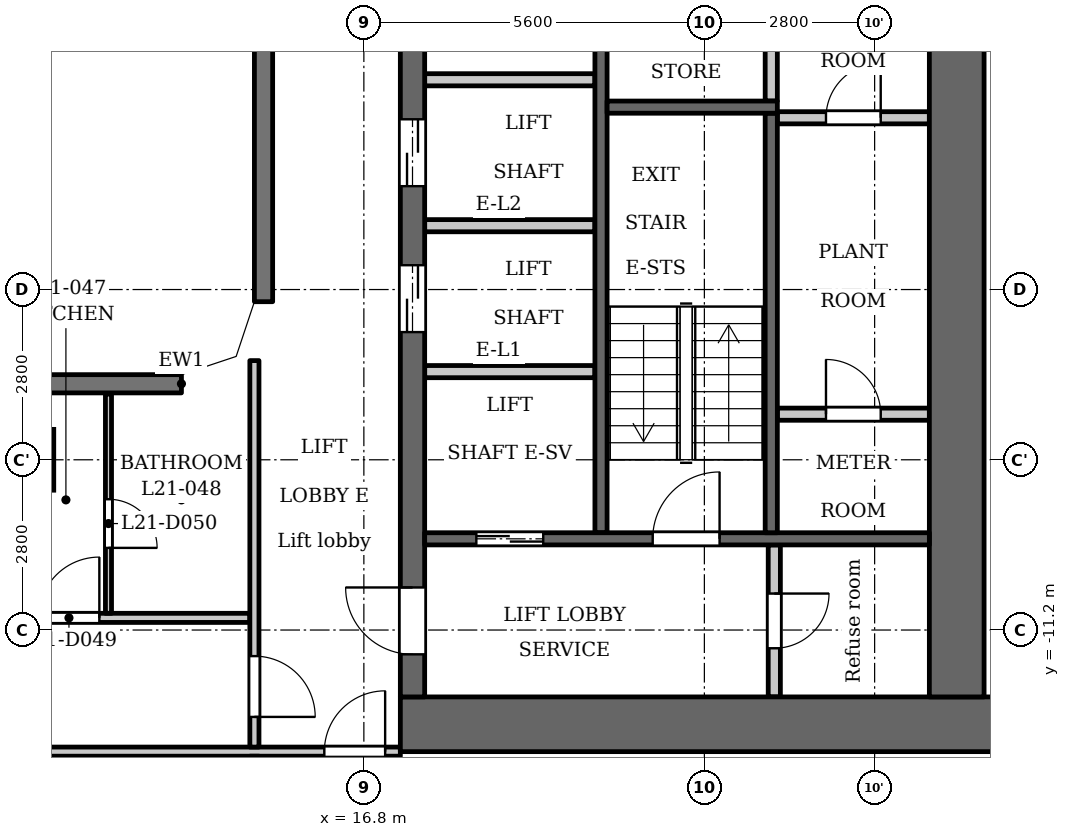
"""IFC4 building model, lengths in metres.
Left out: names, types, materials, properties, quantities, classifications, styles, units other than length and angle.
Written with IfcOpenShell. Run it as: python <this file> out.ifc"""

import sys

from ifc_helpers import new_model, si_unit, direction, frame, frame_2d, origin, origin_2d, place, context, subcontext, project, spatial, polyline, rectangle, outline, extrude, element, fill, save


model = new_model("IFC4")
c1 = context("Model", 3, precision=1e-05, world=origin(), true_north=direction((0.0, 1.0)))
c2 = subcontext(c1, "Body", "Model", "MODEL_VIEW")
j1 = project(units=[si_unit("LENGTHUNIT", "METRE"), si_unit("PLANEANGLEUNIT", "RADIAN")], contexts=[c1])
p1 = place(None, origin())
s1 = spatial("IfcSite", under=j1, at=p1, CompositionType="ELEMENT")
p2 = place(p1, origin())
s2 = spatial("IfcBuilding", under=s1, at=p2, CompositionType="ELEMENT")
p3 = place(p2, frame((0.0, 0.0, 86.8)))
s3 = spatial("IfcBuildingStorey", under=s2, at=p3, CompositionType="ELEMENT", Elevation=86.8)
p4 = place(p3, frame((11.2, -8.4, 0.0), z_axis=(0.0, 0.0, 1.0), x_axis=(1.0, 0.0, 0.0)))
e1 = element("IfcColumn", 1, at=p4, inside=s3, PredefinedType="COLUMN", context=c2, shape_type="SweptSolid", body=[
    extrude(rectangle(XDim=1.0, YDim=1.0, at=origin_2d()), origin(), (0.0, 0.0, 1.0), 3.5),
])
p5 = place(p3, frame((15.15, 5.8, 0.0), z_axis=(0.0, 0.0, 1.0), x_axis=(0.0, -1.0, 0.0)))
e2 = element("IfcWall", 2, at=p5, inside=s3, PredefinedType="SOLIDWALL", context=c2, shape_type="SweptSolid", body=[
    extrude(rectangle(XDim=11.6, YDim=0.3, at=frame_2d((5.8, 0.0))), origin(), (0.0, 0.0, 1.0), 3.2),
])
p6 = place(p3, frame((13.8, -7.15, 0.0), z_axis=(0.0, 0.0, 1.0), x_axis=(-1.0, 0.0, 0.0)))
e3 = element("IfcWall", 3, at=p6, inside=s3, PredefinedType="SOLIDWALL", context=c2, shape_type="SweptSolid", body=[
    extrude(rectangle(XDim=27.6, YDim=0.3, at=frame_2d((13.8, 0.0))), origin(), (0.0, 0.0, 1.0), 3.2),
])
p7 = place(p6, frame((3.6, 0.0, 1.2)))
e4 = element("IfcOpeningElement", 4, at=p7, cuts=e3, PredefinedType="OPENING", context=c2, shape_type="SweptSolid", body=[
    extrude(rectangle(XDim=3.6, YDim=0.95, at=frame_2d((1.8, 0.475))), frame((0.0, 0.16, 0.0), z_axis=(0.0, -1.0, 0.0), x_axis=(1.0, 0.0, 0.0)), (0.0, 0.0, 1.0), 0.32),
])
p8 = place(p6, frame((8.8, 0.0, 0.6)))
e5 = element("IfcOpeningElement", 5, at=p8, cuts=e3, PredefinedType="OPENING", context=c2, shape_type="SweptSolid", body=[
    extrude(rectangle(XDim=1.2, YDim=1.55, at=frame_2d((0.6, 0.775))), frame((0.0, 0.16, 0.0), z_axis=(0.0, -1.0, 0.0), x_axis=(1.0, 0.0, 0.0)), (0.0, 0.0, 1.0), 0.32),
])
p9 = place(p6, frame((11.3, 0.0, 0.9)))
e6 = element("IfcOpeningElement", 6, at=p9, cuts=e3, PredefinedType="OPENING", context=c2, shape_type="SweptSolid", body=[
    extrude(rectangle(XDim=1.8, YDim=1.25, at=frame_2d((0.9, 0.625))), frame((0.0, 0.16, 0.0), z_axis=(0.0, -1.0, 0.0), x_axis=(1.0, 0.0, 0.0)), (0.0, 0.0, 1.0), 0.32),
])
p10 = place(p6, frame((14.8, 0.0, 1.2)))
e7 = element("IfcOpeningElement", 7, at=p10, cuts=e3, PredefinedType="OPENING", context=c2, shape_type="SweptSolid", body=[
    extrude(rectangle(XDim=3.6, YDim=0.95, at=frame_2d((1.8, 0.475))), frame((0.0, 0.16, 0.0), z_axis=(0.0, -1.0, 0.0), x_axis=(1.0, 0.0, 0.0)), (0.0, 0.0, 1.0), 0.32),
])
p11 = place(p6, frame((20.4, 0.0, 1.2)))
e8 = element("IfcOpeningElement", 8, at=p11, cuts=e3, PredefinedType="OPENING", context=c2, shape_type="SweptSolid", body=[
    extrude(rectangle(XDim=3.6, YDim=0.95, at=frame_2d((1.8, 0.475))), frame((0.0, 0.16, 0.0), z_axis=(0.0, -1.0, 0.0), x_axis=(1.0, 0.0, 0.0)), (0.0, 0.0, 1.0), 0.32),
])
p12 = place(p3, frame((23.5, -2.5, 0.0), z_axis=(0.0, 0.0, 1.0), x_axis=(0.0, 1.0, 0.0)))
e9 = element("IfcWall", 9, at=p12, inside=s3, PredefinedType="PARTITIONING", context=c2, shape_type="SweptSolid", body=[
    extrude(rectangle(XDim=2.65, YDim=0.2, at=frame_2d((1.325, 0.0))), origin(), (0.0, 0.0, 1.0), 3.2),
])
p13 = place(p3, frame((20.7, -9.6, 0.0), z_axis=(0.0, 0.0, 1.0), x_axis=(0.0, 1.0, 0.0)))
e10 = element("IfcWall", 10, at=p13, inside=s3, PredefinedType="SHEAR", context=c2, shape_type="SweptSolid", body=[
    extrude(rectangle(XDim=9.75, YDim=0.2, at=frame_2d((4.875, 0.0))), origin(), (0.0, 0.0, 1.0), 3.2),
])
p14 = place(p3, frame((17.4, -12.75, 0.0), z_axis=(0.0, 0.0, 1.0), x_axis=(1.0, 0.0, 0.0)))
e11 = element("IfcWall", 11, at=p14, inside=s3, PredefinedType="SHEAR", context=c2, shape_type="SweptSolid", body=[
    extrude(rectangle(XDim=10.4, YDim=0.9, at=frame_2d((5.2, 0.0))), origin(), (0.0, 0.0, 1.0), 3.2),
])
p15 = place(p3, frame((17.6, -12.3, 0.0), z_axis=(0.0, 0.0, 1.0), x_axis=(0.0, 1.0, 0.0)))
e12 = element("IfcWall", 12, at=p15, inside=s3, PredefinedType="SHEAR", context=c2, shape_type="SweptSolid", body=[
    extrude(rectangle(XDim=24.6, YDim=0.4, at=frame_2d((12.3, 0.0))), origin(), (0.0, 0.0, 1.0), 3.2),
])
p16 = place(p15, frame((6.0, 0.0, 0.0)))
e13 = element("IfcOpeningElement", 13, at=p16, cuts=e12, PredefinedType="OPENING", context=c2, shape_type="SweptSolid", body=[
    extrude(rectangle(XDim=1.1, YDim=2.1, at=frame_2d((0.55, 1.05))), frame((0.0, 0.21, 0.0), z_axis=(0.0, -1.0, 0.0), x_axis=(1.0, 0.0, 0.0)), (0.0, 0.0, 1.0), 0.42),
])
p17 = place(p15, frame((8.4, 0.0, 0.0)))
e14 = element("IfcOpeningElement", 14, at=p17, cuts=e12, PredefinedType="OPENING", context=c2, shape_type="SweptSolid", body=[
    extrude(rectangle(XDim=1.1, YDim=2.1, at=frame_2d((0.55, 1.05))), frame((0.0, 0.21, 0.0), z_axis=(0.0, -1.0, 0.0), x_axis=(1.0, 0.0, 0.0)), (0.0, 0.0, 1.0), 0.42),
])
p18 = place(p15, frame((10.8, 0.0, 0.0)))
e15 = element("IfcOpeningElement", 15, at=p18, cuts=e12, PredefinedType="OPENING", context=c2, shape_type="SweptSolid", body=[
    extrude(rectangle(XDim=1.1, YDim=2.1, at=frame_2d((0.55, 1.05))), frame((0.0, 0.21, 0.0), z_axis=(0.0, -1.0, 0.0), x_axis=(1.0, 0.0, 0.0)), (0.0, 0.0, 1.0), 0.42),
])
p19 = place(p15, frame((16.75, 0.0, 0.0)))
e16 = element("IfcOpeningElement", 16, at=p19, cuts=e12, PredefinedType="OPENING", context=c2, shape_type="SweptSolid", body=[
    extrude(rectangle(XDim=0.9, YDim=2.1, at=frame_2d((0.45, 1.05))), frame((0.0, 0.21, 0.0), z_axis=(0.0, -1.0, 0.0), x_axis=(1.0, 0.0, 0.0)), (0.0, 0.0, 1.0), 0.42),
])
p20 = place(p15, frame((22.8, 0.0, 0.0)))
e17 = element("IfcOpeningElement", 17, at=p20, cuts=e12, PredefinedType="OPENING", context=c2, shape_type="SweptSolid", body=[
    extrude(rectangle(XDim=1.1, YDim=2.1, at=frame_2d((0.55, 1.05))), frame((0.0, 0.21, 0.0), z_axis=(0.0, -1.0, 0.0), x_axis=(1.0, 0.0, 0.0)), (0.0, 0.0, 1.0), 0.42),
])
p21 = place(p15, frame((0.7, 0.0, 0.0)))
e18 = element("IfcOpeningElement", 18, at=p21, cuts=e12, PredefinedType="OPENING", context=c2, shape_type="SweptSolid", body=[
    extrude(rectangle(XDim=1.1, YDim=2.1, at=frame_2d((0.55, 1.05))), frame((0.0, 0.21, 0.0), z_axis=(0.0, -1.0, 0.0), x_axis=(1.0, 0.0, 0.0)), (0.0, 0.0, 1.0), 0.42),
])
p22 = place(p15, frame((12.775, 0.0, 0.0)))
e19 = element("IfcOpeningElement", 19, at=p22, cuts=e12, PredefinedType="OPENING", context=c2, shape_type="SweptSolid", body=[
    extrude(rectangle(XDim=1.8, YDim=2.1, at=frame_2d((0.9, 1.05))), frame((0.0, 0.21, 0.0), z_axis=(0.0, -1.0, 0.0), x_axis=(1.0, 0.0, 0.0)), (0.0, 0.0, 1.0), 0.42),
])
p23 = place(p3, frame((26.55, -12.3, 0.0), z_axis=(0.0, 0.0, 1.0), x_axis=(0.0, 1.0, 0.0)))
e20 = element("IfcWall", 20, at=p23, inside=s3, PredefinedType="SHEAR", context=c2, shape_type="SweptSolid", body=[
    extrude(rectangle(XDim=24.6, YDim=0.9, at=frame_2d((12.3, 0.0))), origin(), (0.0, 0.0, 1.0), 3.2),
])
p24 = place(p3, frame((23.55, -12.3, 0.0), z_axis=(0.0, 0.0, 1.0), x_axis=(0.0, 1.0, 0.0)))
e21 = element("IfcWall", 21, at=p24, inside=s3, PredefinedType="PARTITIONING", context=c2, shape_type="SweptSolid", body=[
    extrude(rectangle(XDim=2.5, YDim=0.2, at=frame_2d((1.25, 0.0))), origin(), (0.0, 0.0, 1.0), 3.2),
])
p25 = place(p24, frame((0.8, 0.0, 0.0)))
e22 = element("IfcOpeningElement", 22, at=p25, cuts=e21, PredefinedType="OPENING", context=c2, shape_type="SweptSolid", body=[
    extrude(rectangle(XDim=0.9, YDim=2.1, at=frame_2d((0.45, 1.05))), frame((0.0, 0.11, 0.0), z_axis=(0.0, -1.0, 0.0), x_axis=(1.0, 0.0, 0.0)), (0.0, 0.0, 1.0), 0.22),
])
p26 = place(p3, frame((23.6, -7.65, 0.0), z_axis=(0.0, 0.0, 1.0), x_axis=(1.0, 0.0, 0.0)))
e23 = element("IfcWall", 23, at=p26, inside=s3, PredefinedType="PARTITIONING", context=c2, shape_type="SweptSolid", body=[
    extrude(rectangle(XDim=2.5, YDim=0.2, at=frame_2d((1.25, 0.0))), origin(), (0.0, 0.0, 1.0), 3.2),
])
p27 = place(p26, frame((0.8, 0.0, 0.0)))
e24 = element("IfcOpeningElement", 24, at=p27, cuts=e23, PredefinedType="OPENING", context=c2, shape_type="SweptSolid", body=[
    extrude(rectangle(XDim=0.9, YDim=2.1, at=frame_2d((0.45, 1.05))), frame((0.0, 0.11, 0.0), z_axis=(0.0, -1.0, 0.0), x_axis=(1.0, 0.0, 0.0)), (0.0, 0.0, 1.0), 0.22),
])
p28 = place(p3, frame((23.6, -2.775, 0.0), z_axis=(0.0, 0.0, 1.0), x_axis=(1.0, 0.0, 0.0)))
e25 = element("IfcWall", 25, at=p28, inside=s3, PredefinedType="PARTITIONING", context=c2, shape_type="SweptSolid", body=[
    extrude(rectangle(XDim=2.5, YDim=0.2, at=frame_2d((1.25, 0.0))), origin(), (0.0, 0.0, 1.0), 3.2),
])
p29 = place(p28, frame((0.8, 0.0, 0.0)))
e26 = element("IfcOpeningElement", 26, at=p29, cuts=e25, PredefinedType="OPENING", context=c2, shape_type="SweptSolid", body=[
    extrude(rectangle(XDim=0.9, YDim=2.1, at=frame_2d((0.45, 1.05))), frame((0.0, 0.11, 0.0), z_axis=(0.0, -1.0, 0.0), x_axis=(1.0, 0.0, 0.0)), (0.0, 0.0, 1.0), 0.22),
])
p30 = place(p3, frame((17.8, -9.7, 0.0), z_axis=(0.0, 0.0, 1.0), x_axis=(1.0, 0.0, 0.0)))
e27 = element("IfcWall", 27, at=p30, inside=s3, PredefinedType="SHEAR", context=c2, shape_type="SweptSolid", body=[
    extrude(rectangle(XDim=8.3, YDim=0.2, at=frame_2d((4.15, 0.0))), origin(), (0.0, 0.0, 1.0), 3.2),
])
p31 = place(p30, frame((0.85, 0.0, 0.0)))
e28 = element("IfcOpeningElement", 28, at=p31, cuts=e27, PredefinedType="OPENING", context=c2, shape_type="SweptSolid", body=[
    extrude(rectangle(XDim=1.1, YDim=2.1, at=frame_2d((0.55, 1.05))), frame((0.0, 0.11, 0.0), z_axis=(0.0, -1.0, 0.0), x_axis=(1.0, 0.0, 0.0)), (0.0, 0.0, 1.0), 0.22),
])
p32 = place(p30, frame((3.75, 0.0, 0.0)))
e29 = element("IfcOpeningElement", 29, at=p32, cuts=e27, PredefinedType="OPENING", context=c2, shape_type="SweptSolid", body=[
    extrude(rectangle(XDim=1.1, YDim=2.1, at=frame_2d((0.55, 1.05))), frame((0.0, 0.11, 0.0), z_axis=(0.0, -1.0, 0.0), x_axis=(1.0, 0.0, 0.0)), (0.0, 0.0, 1.0), 0.22),
])
for number, where, z_axis, x_axis in (
    (30, (17.8, -6.95, 0.0), (0.0, 0.0, 1.0), (1.0, 0.0, 0.0)),
    (31, (17.8, -4.55, 0.0), (0.0, 0.0, 1.0), (1.0, 0.0, 0.0)),
    (32, (17.8, -2.15, 0.0), (0.0, 0.0, 1.0), (1.0, 0.0, 0.0)),
):
    element("IfcWall", number, at=place(p3, frame(where, z_axis=z_axis, x_axis=x_axis)), inside=s3, PredefinedType="PARTITIONING", context=c2, shape_type="SweptSolid", body=[
        extrude(rectangle(XDim=2.8, YDim=0.2, at=frame_2d((1.4, 0.0))), origin(), (0.0, 0.0, 1.0), 3.2),
    ])
p33 = place(p3, frame((23.5, -9.6, 0.0), z_axis=(0.0, 0.0, 1.0), x_axis=(0.0, 1.0, 0.0)))
e33 = element("IfcWall", 33, at=p33, inside=s3, PredefinedType="SHEAR", context=c2, shape_type="SweptSolid", body=[
    extrude(rectangle(XDim=6.9, YDim=0.2, at=frame_2d((3.45, 0.0))), origin(), (0.0, 0.0, 1.0), 3.2),
])
p34 = place(p3, frame((20.8, -2.6, 0.0), z_axis=(0.0, 0.0, 1.0), x_axis=(1.0, 0.0, 0.0)))
e34 = element("IfcWall", 34, at=p34, inside=s3, PredefinedType="SHEAR", context=c2, shape_type="SweptSolid", body=[
    extrude(rectangle(XDim=2.8, YDim=0.2, at=frame_2d((1.4, 0.0))), origin(), (0.0, 0.0, 1.0), 3.2),
])
p35 = place(p3, frame((-17.4, -13.2, 0.0), z_axis=(0.0, 0.0, 1.0), x_axis=(1.0, 0.0, 0.0)))
e35 = element("IfcWall", 35, at=p35, inside=s3, PredefinedType="PARTITIONING", context=c2, shape_type="SweptSolid", body=[
    extrude(rectangle(XDim=34.8, YDim=0.15, at=frame_2d((17.4, 0.0))), origin(), (0.0, 0.0, 1.0), 3.2),
])
p36 = place(p35, frame((0.15, 0.0, 0.0)))
e36 = element("IfcOpeningElement", 36, at=p36, cuts=e35, PredefinedType="OPENING", context=c2, shape_type="SweptSolid", body=[
    extrude(rectangle(XDim=1.0, YDim=2.1, at=frame_2d((0.5, 1.05))), frame((0.0, 0.085, 0.0), z_axis=(0.0, -1.0, 0.0), x_axis=(1.0, 0.0, 0.0)), (0.0, 0.0, 1.0), 0.17),
])
p37 = place(p35, frame((33.55, 0.0, 0.0)))
e37 = element("IfcOpeningElement", 37, at=p37, cuts=e35, PredefinedType="OPENING", context=c2, shape_type="SweptSolid", body=[
    extrude(rectangle(XDim=1.0, YDim=2.1, at=frame_2d((0.5, 1.05))), frame((0.0, 0.085, 0.0), z_axis=(0.0, -1.0, 0.0), x_axis=(1.0, 0.0, 0.0)), (0.0, 0.0, 1.0), 0.17),
])
p38 = place(p35, frame((7.35, 0.0, 0.0)))
e38 = element("IfcOpeningElement", 38, at=p38, cuts=e35, PredefinedType="OPENING", context=c2, shape_type="SweptSolid", body=[
    extrude(rectangle(XDim=1.0, YDim=2.1, at=frame_2d((0.5, 1.05))), frame((0.0, 0.085, 0.0), z_axis=(0.0, -1.0, 0.0), x_axis=(1.0, 0.0, 0.0)), (0.0, 0.0, 1.0), 0.17),
])
p39 = place(p35, frame((13.7, 0.0, 0.0)))
e39 = element("IfcOpeningElement", 39, at=p39, cuts=e35, PredefinedType="OPENING", context=c2, shape_type="SweptSolid", body=[
    extrude(rectangle(XDim=1.0, YDim=2.1, at=frame_2d((0.5, 1.05))), frame((0.0, 0.085, 0.0), z_axis=(0.0, -1.0, 0.0), x_axis=(1.0, 0.0, 0.0)), (0.0, 0.0, 1.0), 0.17),
])
p40 = place(p35, frame((19.3, 0.0, 0.0)))
e40 = element("IfcOpeningElement", 40, at=p40, cuts=e35, PredefinedType="OPENING", context=c2, shape_type="SweptSolid", body=[
    extrude(rectangle(XDim=1.0, YDim=2.1, at=frame_2d((0.5, 1.05))), frame((0.0, 0.085, 0.0), z_axis=(0.0, -1.0, 0.0), x_axis=(1.0, 0.0, 0.0)), (0.0, 0.0, 1.0), 0.17),
])
p41 = place(p3, frame((-14.925, -11.0, 0.0), z_axis=(0.0, 0.0, 1.0), x_axis=(1.0, 0.0, 0.0)))
e41 = element("IfcWall", 41, at=p41, inside=s3, PredefinedType="PARTITIONING", context=c2, shape_type="SweptSolid", body=[
    extrude(rectangle(XDim=29.85, YDim=0.15, at=frame_2d((14.925, 0.0))), origin(), (0.0, 0.0, 1.0), 3.2),
])
p42 = place(p41, frame((2.575, 0.0, 0.0)))
e42 = element("IfcOpeningElement", 42, at=p42, cuts=e41, PredefinedType="OPENING", context=c2, shape_type="SweptSolid", body=[
    extrude(rectangle(XDim=1.0, YDim=2.1, at=frame_2d((0.5, 1.05))), frame((0.0, 0.085, 0.0), z_axis=(0.0, -1.0, 0.0), x_axis=(1.0, 0.0, 0.0)), (0.0, 0.0, 1.0), 0.17),
])
p43 = place(p41, frame((15.475, 0.0, 0.0)))
e43 = element("IfcOpeningElement", 43, at=p43, cuts=e41, PredefinedType="OPENING", context=c2, shape_type="SweptSolid", body=[
    extrude(rectangle(XDim=1.0, YDim=2.1, at=frame_2d((0.5, 1.05))), frame((0.0, 0.085, 0.0), z_axis=(0.0, -1.0, 0.0), x_axis=(1.0, 0.0, 0.0)), (0.0, 0.0, 1.0), 0.17),
])
p44 = place(p41, frame((26.375, 0.0, 0.0)))
e44 = element("IfcOpeningElement", 44, at=p44, cuts=e41, PredefinedType="OPENING", context=c2, shape_type="SweptSolid", body=[
    extrude(rectangle(XDim=1.0, YDim=2.1, at=frame_2d((0.5, 1.05))), frame((0.0, 0.085, 0.0), z_axis=(0.0, -1.0, 0.0), x_axis=(1.0, 0.0, 0.0)), (0.0, 0.0, 1.0), 0.17),
])
p45 = place(p3, frame((12.6, -10.925, 0.0), z_axis=(0.0, 0.0, 1.0), x_axis=(0.0, 1.0, 0.0)))
e45 = element("IfcWall", 45, at=p45, inside=s3, PredefinedType="PARTITIONING", context=c2, shape_type="SweptSolid", body=[
    extrude(rectangle(XDim=3.605, YDim=0.1, at=frame_2d((1.802, 0.0))), origin(), (0.0, 0.0, 1.0), 3.2),
])
p46 = place(p45, frame((1.076, 0.0, 0.0)))
e46 = element("IfcOpeningElement", 46, at=p46, cuts=e45, PredefinedType="OPENING", context=c2, shape_type="SweptSolid", body=[
    extrude(rectangle(XDim=0.8, YDim=2.1, at=frame_2d((0.4, 1.05))), frame((0.0, 0.06, 0.0), z_axis=(0.0, -1.0, 0.0), x_axis=(1.0, 0.0, 0.0)), (0.0, 0.0, 1.0), 0.12),
])
p47 = place(p3, frame((15.0, -15.325, 0.0), z_axis=(0.0, 0.0, 1.0), x_axis=(0.0, 1.0, 0.0)))
e47 = element("IfcWall", 47, at=p47, inside=s3, PredefinedType="PARTITIONING", context=c2, shape_type="SweptSolid", body=[
    extrude(rectangle(XDim=2.05, YDim=0.15, at=frame_2d((1.025, 0.0))), origin(), (0.0, 0.0, 1.0), 3.2),
])
p48 = place(p47, frame((0.474, 0.0, 0.0)))
e48 = element("IfcOpeningElement", 48, at=p48, cuts=e47, PredefinedType="OPENING", context=c2, shape_type="SweptSolid", body=[
    extrude(rectangle(XDim=1.0, YDim=2.1, at=frame_2d((0.5, 1.05))), frame((0.0, 0.085, 0.0), z_axis=(0.0, -1.0, 0.0), x_axis=(1.0, 0.0, 0.0)), (0.0, 0.0, 1.0), 0.17),
])
p49 = place(p3, frame((15.0, -13.125, 0.0), z_axis=(0.0, 0.0, 1.0), x_axis=(0.0, 1.0, 0.0)))
e49 = element("IfcWall", 49, at=p49, inside=s3, PredefinedType="PARTITIONING", context=c2, shape_type="SweptSolid", body=[
    extrude(rectangle(XDim=6.356, YDim=0.15, at=frame_2d((3.178, 0.0))), origin(), (0.0, 0.0, 1.0), 3.2),
])
p50 = place(p49, frame((0.496, 0.0, 0.0)))
e50 = element("IfcOpeningElement", 50, at=p50, cuts=e49, PredefinedType="OPENING", context=c2, shape_type="SweptSolid", body=[
    extrude(rectangle(XDim=1.0, YDim=2.1, at=frame_2d((0.5, 1.05))), frame((0.0, 0.085, 0.0), z_axis=(0.0, -1.0, 0.0), x_axis=(1.0, 0.0, 0.0)), (0.0, 0.0, 1.0), 0.17),
])
p51 = place(p3, origin())
e51 = element("IfcWall", 51, at=p51, inside=s3, PredefinedType="SOLIDWALL", context=c2, shape_type="SweptSolid", body=[
    extrude(outline(polyline([(14.937, -6.937), (15.3, -5.849), (15.3, -5.8), (15.0, -5.8), (14.7, -6.7), (13.8, -7.0), (13.8, -7.3), (13.849, -7.3), (14.937, -6.937)])), origin(), (0.0, 0.0, 1.0), 3.2),
])
p52 = place(p31, origin())
e52 = element("IfcDoor", 52, at=p52, inside=s3, OperationType="DOUBLE_DOOR_SLIDING", PredefinedType="DOOR", context=c2, shape_type="SweptSolid", body=[
    extrude(rectangle(XDim=1.1, YDim=2.1, at=frame_2d((0.55, 1.05))), frame((0.0, 0.025, 0.0), z_axis=(0.0, -1.0, 0.0), x_axis=(1.0, 0.0, 0.0)), (0.0, 0.0, 1.0), 0.05),
])
fill(e28, e52)
p53 = place(p16, origin())
e53 = element("IfcDoor", 53, at=p53, inside=s3, OperationType="DOUBLE_DOOR_SLIDING", PredefinedType="DOOR", context=c2, shape_type="SweptSolid", body=[
    extrude(rectangle(XDim=1.1, YDim=2.1, at=frame_2d((0.55, 1.05))), frame((0.0, 0.025, 0.0), z_axis=(0.0, -1.0, 0.0), x_axis=(1.0, 0.0, 0.0)), (0.0, 0.0, 1.0), 0.05),
])
fill(e13, e53)
p54 = place(p17, origin())
e54 = element("IfcDoor", 54, at=p54, inside=s3, OperationType="DOUBLE_DOOR_SLIDING", PredefinedType="DOOR", context=c2, shape_type="SweptSolid", body=[
    extrude(rectangle(XDim=1.1, YDim=2.1, at=frame_2d((0.55, 1.05))), frame((0.0, 0.025, 0.0), z_axis=(0.0, -1.0, 0.0), x_axis=(1.0, 0.0, 0.0)), (0.0, 0.0, 1.0), 0.05),
])
fill(e14, e54)
p55 = place(p21, origin())
e55 = element("IfcDoor", 55, at=p55, inside=s3, OperationType="SINGLE_SWING_LEFT", PredefinedType="DOOR", context=c2, shape_type="SweptSolid", body=[
    extrude(rectangle(XDim=1.1, YDim=2.1, at=frame_2d((0.55, 1.05))), frame((0.0, 0.025, 0.0), z_axis=(0.0, -1.0, 0.0), x_axis=(1.0, 0.0, 0.0)), (0.0, 0.0, 1.0), 0.05),
])
fill(e18, e55)
p56 = place(p25, origin())
e56 = element("IfcDoor", 56, at=p56, inside=s3, OperationType="SINGLE_SWING_RIGHT", PredefinedType="DOOR", context=c2, shape_type="SweptSolid", body=[
    extrude(rectangle(XDim=0.9, YDim=2.1, at=frame_2d((0.45, 1.05))), frame((0.0, 0.025, 0.0), z_axis=(0.0, -1.0, 0.0), x_axis=(1.0, 0.0, 0.0)), (0.0, 0.0, 1.0), 0.05),
])
fill(e22, e56)
p57 = place(p32, origin())
e57 = element("IfcDoor", 57, at=p57, inside=s3, OperationType="SINGLE_SWING_LEFT", PredefinedType="DOOR", context=c2, shape_type="SweptSolid", body=[
    extrude(rectangle(XDim=1.1, YDim=2.1, at=frame_2d((0.55, 1.05))), frame((0.0, 0.025, 0.0), z_axis=(0.0, -1.0, 0.0), x_axis=(1.0, 0.0, 0.0)), (0.0, 0.0, 1.0), 0.05),
])
fill(e29, e57)
p58 = place(p27, origin())
e58 = element("IfcDoor", 58, at=p58, inside=s3, OperationType="SINGLE_SWING_RIGHT", PredefinedType="DOOR", context=c2, shape_type="SweptSolid", body=[
    extrude(rectangle(XDim=0.9, YDim=2.1, at=frame_2d((0.45, 1.05))), frame((0.0, 0.025, 0.0), z_axis=(0.0, -1.0, 0.0), x_axis=(1.0, 0.0, 0.0)), (0.0, 0.0, 1.0), 0.05),
])
fill(e24, e58)
p59 = place(p29, origin())
e59 = element("IfcDoor", 59, at=p59, inside=s3, OperationType="SINGLE_SWING_LEFT", PredefinedType="DOOR", context=c2, shape_type="SweptSolid", body=[
    extrude(rectangle(XDim=0.9, YDim=2.1, at=frame_2d((0.45, 1.05))), frame((0.0, 0.025, 0.0), z_axis=(0.0, -1.0, 0.0), x_axis=(1.0, 0.0, 0.0)), (0.0, 0.0, 1.0), 0.05),
])
fill(e26, e59)
p60 = place(p50, origin())
e60 = element("IfcDoor", 60, at=p60, inside=s3, OperationType="SINGLE_SWING_LEFT", PredefinedType="DOOR", context=c2, shape_type="SweptSolid", body=[
    extrude(rectangle(XDim=1.0, YDim=2.1, at=frame_2d((0.5, 1.05))), frame((0.0, 0.025, 0.0), z_axis=(0.0, -1.0, 0.0), x_axis=(1.0, 0.0, 0.0)), (0.0, 0.0, 1.0), 0.05),
])
fill(e50, e60)
p61 = place(p37, origin())
e61 = element("IfcDoor", 61, at=p61, inside=s3, OperationType="SINGLE_SWING_LEFT", PredefinedType="DOOR", context=c2, shape_type="SweptSolid", body=[
    extrude(rectangle(XDim=1.0, YDim=2.1, at=frame_2d((0.5, 1.05))), frame((0.0, 0.025, 0.0), z_axis=(0.0, -1.0, 0.0), x_axis=(1.0, 0.0, 0.0)), (0.0, 0.0, 1.0), 0.05),
])
fill(e37, e61)
p62 = place(p44, origin())
e62 = element("IfcDoor", 62, at=p62, inside=s3, OperationType="SINGLE_SWING_LEFT", PredefinedType="DOOR", context=c2, shape_type="SweptSolid", body=[
    extrude(rectangle(XDim=1.0, YDim=2.1, at=frame_2d((0.5, 1.05))), frame((0.0, 0.025, 0.0), z_axis=(0.0, -1.0, 0.0), x_axis=(1.0, 0.0, 0.0)), (0.0, 0.0, 1.0), 0.05),
])
fill(e44, e62)
p63 = place(p46, origin())
e63 = element("IfcDoor", 63, at=p63, inside=s3, OperationType="SINGLE_SWING_LEFT", PredefinedType="DOOR", context=c2, shape_type="SweptSolid", body=[
    extrude(rectangle(XDim=0.8, YDim=2.1, at=frame_2d((0.4, 1.05))), frame((0.0, 0.025, 0.0), z_axis=(0.0, -1.0, 0.0), x_axis=(1.0, 0.0, 0.0)), (0.0, 0.0, 1.0), 0.05),
])
fill(e46, e63)
save(model, sys.argv[1])
